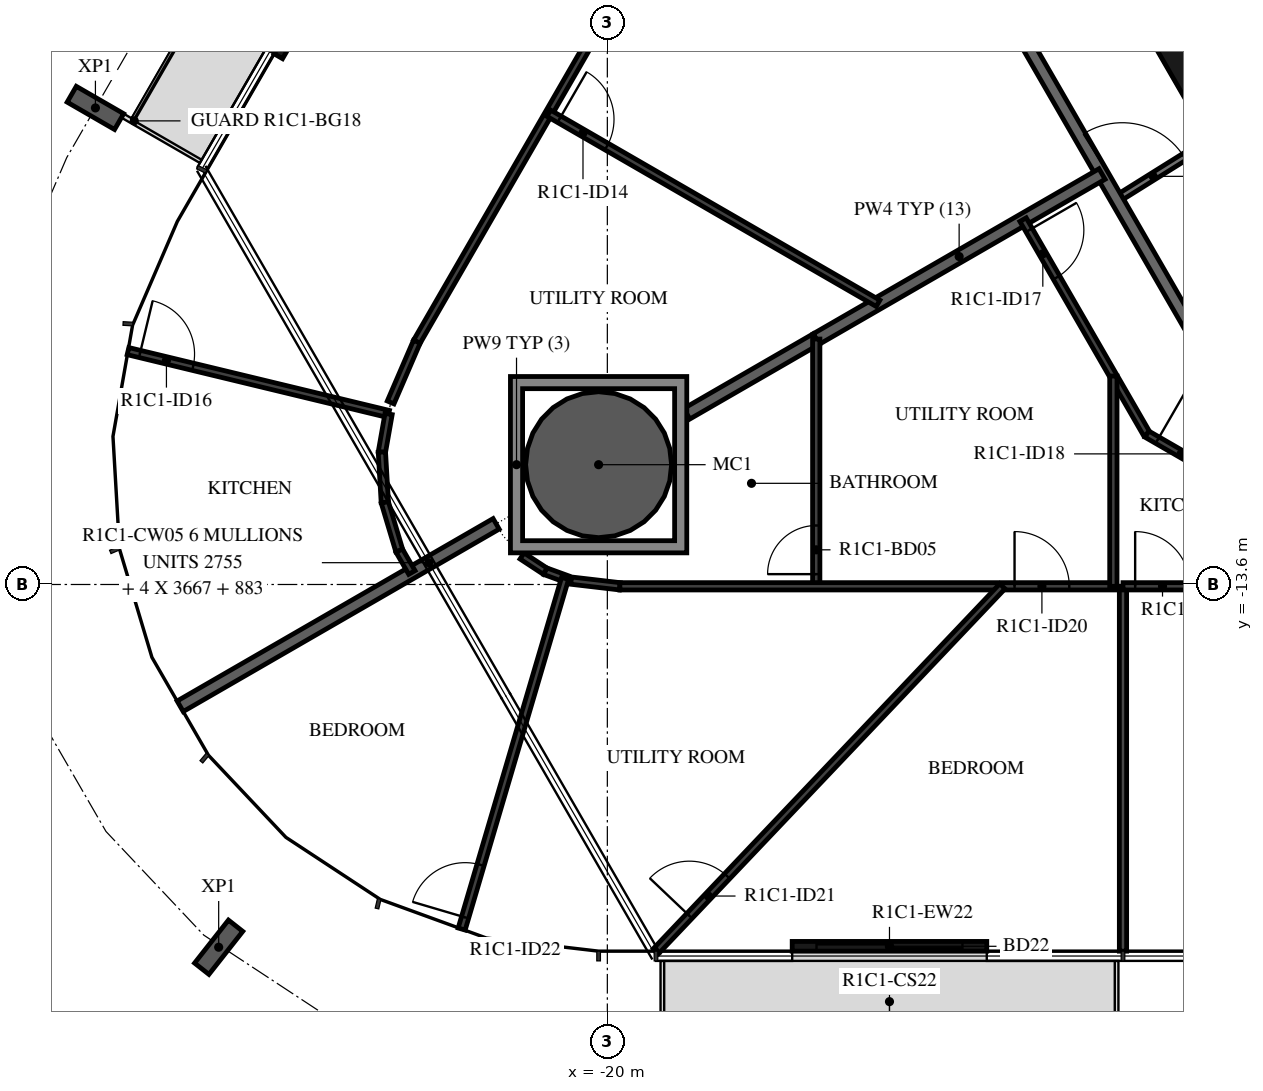
"""IFC4 building model, lengths in metres.
Left out: names, types, materials, properties, quantities, classifications, styles, units other than length and angle.
Written with IfcOpenShell. Run it as: python <this file> out.ifc"""

import sys

from ifc_helpers import new_model, si_unit, direction, frame, frame_2d, origin, origin_2d, place, context, subcontext, project, spatial, polyline, rectangle, hollow_circle, i_section, outline, extrude, element, fill, save


model = new_model("IFC4")
c1 = context("Model", 3, precision=1e-05, world=origin(), true_north=direction((0.0, 1.0)))
c2 = subcontext(c1, "Body", "Model", "MODEL_VIEW")
j1 = project(units=[si_unit("LENGTHUNIT", "METRE"), si_unit("PLANEANGLEUNIT", "RADIAN")], contexts=[c1])
p1 = place(None, origin())
s1 = spatial("IfcSite", under=j1, at=p1, CompositionType="ELEMENT")
p2 = place(p1, origin())
s2 = spatial("IfcBuilding", under=s1, at=p2, CompositionType="ELEMENT")
p3 = place(p2, frame((0.0, 0.0, 62.9)))
s3 = spatial("IfcBuildingStorey", under=s2, at=p3, CompositionType="ELEMENT", Elevation=62.9)
p4 = place(p3, frame((-20.144, -11.63, -0.38), z_axis=(0.0, 0.0, 1.0), x_axis=(1.0, 0.0, 0.0)))
e1 = element("IfcColumn", 1, at=p4, inside=s3, PredefinedType="COLUMN", context=c2, shape_type="SweptSolid", body=[
    extrude(hollow_circle(Radius=1.2, WallThickness=0.06, at=origin_2d()), origin(), (0.0, 0.0, 1.0), 3.5),
])
for number, where, z_axis, x_axis in (
    (2, (-28.419, -5.763, -0.38), (0.0, 0.0, 1.0), (0.5, 0.866, 0.0)),
    (3, (-26.392, -19.565, -0.38), (0.0, 0.0, 1.0), (-0.786, 0.619, 0.0)),
):
    element("IfcColumn", number, at=place(p3, frame(where, z_axis=z_axis, x_axis=x_axis)), inside=s3, PredefinedType="COLUMN", context=c2, shape_type="SweptSolid", body=[
        extrude(i_section(OverallWidth=0.3, OverallDepth=0.9, WebThickness=0.019, FlangeThickness=0.035, FilletRadius=0.03, at=origin_2d()), origin(), (0.0, 0.0, 1.0), 3.5),
    ])
p5 = place(p3, frame((-23.811, -2.142, 0.0), z_axis=(0.0, 0.0, 1.0), x_axis=(-0.500028443584, -0.866008981251, 0.0)))
e4 = element("IfcWall", 4, at=p5, inside=s3, PredefinedType="STANDARD", context=c2, shape_type="SweptSolid", body=[
    extrude(rectangle(XDim=3.2, YDim=0.16, at=frame_2d((1.6, 0.0))), origin(), (0.0, 0.0, 1.0), 3.12),
])
p6 = place(p5, frame((0.4, 0.0, 0.0)))
e5 = element("IfcOpeningElement", 5, at=p6, cuts=e4, PredefinedType="OPENING", context=c2, shape_type="SweptSolid", body=[
    extrude(rectangle(XDim=2.4, YDim=2.4, at=frame_2d((1.2, 1.2))), frame((0.0, 0.09, 0.0), z_axis=(0.0, -1.0, 0.0), x_axis=(1.0, 0.0, 0.0)), (0.0, 0.0, 1.0), 0.18),
])
p7 = place(p3, frame((-16.96, -19.55, 0.0), z_axis=(0.0, 0.0, 1.0), x_axis=(1.0, 0.0, 0.0)))
e6 = element("IfcWall", 6, at=p7, inside=s3, PredefinedType="STANDARD", context=c2, shape_type="SweptSolid", body=[
    extrude(rectangle(XDim=3.2, YDim=0.16, at=frame_2d((1.6, 0.0))), origin(), (0.0, 0.0, 1.0), 3.12),
])
p8 = place(p7, frame((0.4, 0.0, 0.0)))
e7 = element("IfcOpeningElement", 7, at=p8, cuts=e6, PredefinedType="OPENING", context=c2, shape_type="SweptSolid", body=[
    extrude(rectangle(XDim=2.4, YDim=2.4, at=frame_2d((1.2, 1.2))), frame((0.0, 0.09, 0.0), z_axis=(0.0, -1.0, 0.0), x_axis=(1.0, 0.0, 0.0)), (0.0, 0.0, 1.0), 0.18),
])
p9 = place(p3, frame((-10.845, -4.51, 0.0), z_axis=(0.0, 0.0, 1.0), x_axis=(0.500087131594, -0.865975092491, 0.0)))
e8 = element("IfcWall", 8, at=p9, inside=s3, PredefinedType="SHEAR", context=c2, shape_type="SweptSolid", body=[
    extrude(rectangle(XDim=3.033, YDim=0.5, at=frame_2d((1.516, 0.0))), origin(), (0.0, 0.0, 1.0), 3.12),
])
p10 = place(p3, frame((-11.625, -7.264, 0.0), z_axis=(0.0, 0.0, 1.0), x_axis=(0.84803632456, 0.529938102259, 0.0)))
e9 = element("IfcWall", 9, at=p10, inside=s3, PredefinedType="PARTITIONING", context=c2, shape_type="SweptSolid", body=[
    extrude(rectangle(XDim=1.804, YDim=0.12, at=frame_2d((0.902, 0.0))), origin(), (0.0, 0.0, 1.0), 3.12),
])
p11 = place(p10, frame((0.11, 0.0, 0.0)))
e10 = element("IfcOpeningElement", 10, at=p11, cuts=e9, PredefinedType="OPENING", context=c2, shape_type="SweptSolid", body=[
    extrude(rectangle(XDim=1.2, YDim=2.1, at=frame_2d((0.6, 1.05))), frame((0.0, 0.07, 0.0), z_axis=(0.0, -1.0, 0.0), x_axis=(1.0, 0.0, 0.0)), (0.0, 0.0, 1.0), 0.14),
])
p12 = place(p3, frame((-13.7, -3.671, 0.0), z_axis=(0.0, 0.0, 1.0), x_axis=(0.500001669485, -0.866024439905, 0.0)))
e11 = element("IfcWall", 11, at=p12, inside=s3, PredefinedType="STANDARD", context=c2, shape_type="SweptSolid", body=[
    extrude(rectangle(XDim=7.342, YDim=0.2, at=frame_2d((3.671, 0.0))), origin(), (0.0, 0.0, 1.0), 3.12),
])
p13 = place(p3, frame((-16.565, -9.564, 0.0), z_axis=(0.0, 0.0, 1.0), x_axis=(0.866028274568, 0.499995027624, 0.0)))
e12 = element("IfcWall", 12, at=p13, inside=s3, PredefinedType="STANDARD", context=c2, shape_type="SweptSolid", body=[
    extrude(rectangle(XDim=5.427, YDim=0.2, at=frame_2d((2.714, 0.0))), origin(), (0.0, 0.0, 1.0), 3.12),
])
p14 = place(p3, frame((-27.025, -15.603, 0.0), z_axis=(0.0, 0.0, 1.0), x_axis=(0.866020924479, 0.500007758305, 0.0)))
e13 = element("IfcWall", 13, at=p14, inside=s3, PredefinedType="STANDARD", context=c2, shape_type="SweptSolid", body=[
    extrude(rectangle(XDim=6.0, YDim=0.2, at=frame_2d((3.0, 0.0))), origin(), (0.0, 0.0, 1.0), 3.12),
])
p15 = place(p3, frame((-18.694, -10.793, 0.0), z_axis=(0.0, 0.0, 1.0), x_axis=(0.866046662726, 0.499963176624, 0.0)))
e14 = element("IfcWall", 14, at=p15, inside=s3, PredefinedType="STANDARD", context=c2, shape_type="SweptSolid", body=[
    extrude(rectangle(XDim=2.458, YDim=0.2, at=frame_2d((1.229, 0.0))), origin(), (0.0, 0.0, 1.0), 3.12),
])
p16 = place(p3, frame((-17.13, 0.79, 0.0), z_axis=(0.0, 0.0, 1.0), x_axis=(-0.499997052475, -0.866027105532, 0.0)))
e15 = element("IfcWall", 15, at=p16, inside=s3, PredefinedType="PARTITIONING", context=c2, shape_type="SweptSolid", body=[
    extrude(rectangle(XDim=12.006, YDim=0.12, at=frame_2d((6.003, 0.0))), origin(), (0.0, 0.0, 1.0), 3.12),
])
p17 = place(p16, frame((1.498, 0.0, 0.0)))
e16 = element("IfcOpeningElement", 16, at=p17, cuts=e15, PredefinedType="OPENING", context=c2, shape_type="SweptSolid", body=[
    extrude(rectangle(XDim=0.9, YDim=2.1, at=frame_2d((0.45, 1.05))), frame((0.0, 0.07, 0.0), z_axis=(0.0, -1.0, 0.0), x_axis=(1.0, 0.0, 0.0)), (0.0, 0.0, 1.0), 0.14),
])
p18 = place(p3, frame((-20.963, -5.85, 0.0), z_axis=(0.0, 0.0, 1.0), x_axis=(0.866021746608, -0.500006334362, 0.0)))
e17 = element("IfcWall", 17, at=p18, inside=s3, PredefinedType="PARTITIONING", context=c2, shape_type="SweptSolid", body=[
    extrude(rectangle(XDim=6.253, YDim=0.12, at=frame_2d((3.127, 0.0))), origin(), (0.0, 0.0, 1.0), 3.12),
])
p19 = place(p18, frame((0.2, 0.0, 0.0)))
e18 = element("IfcOpeningElement", 18, at=p19, cuts=e17, PredefinedType="OPENING", context=c2, shape_type="SweptSolid", body=[
    extrude(rectangle(XDim=0.9, YDim=2.1, at=frame_2d((0.45, 1.05))), frame((0.0, 0.07, 0.0), z_axis=(0.0, -1.0, 0.0), x_axis=(1.0, 0.0, 0.0)), (0.0, 0.0, 1.0), 0.14),
])
p20 = place(p3, frame((-23.564, -10.606, 0.0), z_axis=(0.0, 0.0, 1.0), x_axis=(0.396195073027, 0.918166359713, 0.0)))
e19 = element("IfcWall", 19, at=p20, inside=s3, PredefinedType="PARTITIONING", context=c2, shape_type="SweptSolid", body=[
    extrude(rectangle(XDim=1.087, YDim=0.12, at=frame_2d((0.543, 0.0))), origin(), (0.0, 0.0, 1.0), 3.12),
])
p21 = place(p3, frame((-27.883, -9.762, 0.0), z_axis=(0.0, 0.0, 1.0), x_axis=(0.972097015458, -0.234579181809, 0.0)))
e20 = element("IfcWall", 20, at=p21, inside=s3, PredefinedType="PARTITIONING", context=c2, shape_type="SweptSolid", body=[
    extrude(rectangle(XDim=4.409, YDim=0.12, at=frame_2d((2.204, 0.0))), origin(), (0.0, 0.0, 1.0), 3.12),
])
p22 = place(p21, frame((0.2, 0.0, 0.0)))
e21 = element("IfcOpeningElement", 21, at=p22, cuts=e20, PredefinedType="OPENING", context=c2, shape_type="SweptSolid", body=[
    extrude(rectangle(XDim=0.9, YDim=2.1, at=frame_2d((0.45, 1.05))), frame((0.0, 0.07, 0.0), z_axis=(0.0, -1.0, 0.0), x_axis=(1.0, 0.0, 0.0)), (0.0, 0.0, 1.0), 0.14),
])
p23 = place(p3, frame((-23.597, -10.796, 0.0), z_axis=(0.0, 0.0, 1.0), x_axis=(-0.173610040386, -0.984814476882, 0.0)))
e22 = element("IfcWall", 22, at=p23, inside=s3, PredefinedType="PARTITIONING", context=c2, shape_type="SweptSolid", body=[
    extrude(rectangle(XDim=0.636, YDim=0.12, at=frame_2d((0.318, 0.0))), origin(), (0.0, 0.0, 1.0), 3.12),
])
p24 = place(p3, frame((-23.708, -11.422, 0.0), z_axis=(0.0, 0.0, 1.0), x_axis=(0.058031280246, -0.998314765248, 0.0)))
e23 = element("IfcWall", 23, at=p24, inside=s3, PredefinedType="PARTITIONING", context=c2, shape_type="SweptSolid", body=[
    extrude(rectangle(XDim=0.829, YDim=0.12, at=frame_2d((0.415, 0.0))), origin(), (0.0, 0.0, 1.0), 3.12),
])
p25 = place(p3, frame((-23.659, -12.25, 0.0), z_axis=(0.0, 0.0, 1.0), x_axis=(0.286834510868, -0.957980147694, 0.0)))
e24 = element("IfcWall", 24, at=p25, inside=s3, PredefinedType="PARTITIONING", context=c2, shape_type="SweptSolid", body=[
    extrude(rectangle(XDim=0.829, YDim=0.12, at=frame_2d((0.415, 0.0))), origin(), (0.0, 0.0, 1.0), 3.12),
])
p26 = place(p3, frame((-23.422, -13.044, 0.0), z_axis=(0.0, 0.0, 1.0), x_axis=(0.50013037474, -0.865950118807, 0.0)))
e25 = element("IfcWall", 25, at=p26, inside=s3, PredefinedType="PARTITIONING", context=c2, shape_type="SweptSolid", body=[
    extrude(rectangle(XDim=0.415, YDim=0.12, at=frame_2d((0.207, 0.0))), origin(), (0.0, 0.0, 1.0), 3.12),
])
p27 = place(p3, frame((-13.164, -7.6, 0.0), z_axis=(0.0, 0.0, 1.0), x_axis=(0.500000928893, -0.866024867487, 0.0)))
e26 = element("IfcWall", 26, at=p27, inside=s3, PredefinedType="PARTITIONING", context=c2, shape_type="SweptSolid", body=[
    extrude(rectangle(XDim=4.073, YDim=0.12, at=frame_2d((2.036, 0.0))), origin(), (0.0, 0.0, 1.0), 3.12),
])
p28 = place(p27, frame((0.2, 0.0, 0.0)))
e27 = element("IfcOpeningElement", 27, at=p28, cuts=e26, PredefinedType="OPENING", context=c2, shape_type="SweptSolid", body=[
    extrude(rectangle(XDim=0.9, YDim=2.1, at=frame_2d((0.45, 1.05))), frame((0.0, 0.07, 0.0), z_axis=(0.0, -1.0, 0.0), x_axis=(1.0, 0.0, 0.0)), (0.0, 0.0, 1.0), 0.14),
])
p29 = place(p3, frame((-11.127, -11.127, 0.0), z_axis=(0.0, 0.0, 1.0), x_axis=(0.866034514313, -0.499984219769, 0.0)))
e28 = element("IfcWall", 28, at=p29, inside=s3, PredefinedType="PARTITIONING", context=c2, shape_type="SweptSolid", body=[
    extrude(rectangle(XDim=5.006, YDim=0.12, at=frame_2d((2.503, 0.0))), origin(), (0.0, 0.0, 1.0), 3.12),
])
p30 = place(p29, frame((0.2, 0.0, 0.0)))
e29 = element("IfcOpeningElement", 29, at=p30, cuts=e28, PredefinedType="OPENING", context=c2, shape_type="SweptSolid", body=[
    extrude(rectangle(XDim=0.9, YDim=2.1, at=frame_2d((0.45, 1.05))), frame((0.0, 0.07, 0.0), z_axis=(0.0, -1.0, 0.0), x_axis=(1.0, 0.0, 0.0)), (0.0, 0.0, 1.0), 0.14),
])
p31 = place(p3, frame((-20.657, -13.514, 0.0), z_axis=(0.0, 0.0, 1.0), x_axis=(-0.939665068469, 0.34209583321, 0.0)))
e30 = element("IfcWall", 30, at=p31, inside=s3, PredefinedType="PARTITIONING", context=c2, shape_type="SweptSolid", body=[
    extrude(rectangle(XDim=0.389, YDim=0.12, at=frame_2d((0.194, 0.0))), origin(), (0.0, 0.0, 1.0), 3.12),
])
p32 = place(p3, frame((-21.023, -13.381, 0.0), z_axis=(0.0, 0.0, 1.0), x_axis=(-0.835339231854, 0.549734815821, 0.0)))
e31 = element("IfcWall", 31, at=p32, inside=s3, PredefinedType="PARTITIONING", context=c2, shape_type="SweptSolid", body=[
    extrude(rectangle(XDim=0.455, YDim=0.12, at=frame_2d((0.228, 0.0))), origin(), (0.0, 0.0, 1.0), 3.12),
])
p33 = place(p3, frame((-22.396, -19.266, 0.0), z_axis=(0.0, 0.0, 1.0), x_axis=(0.282896205585, 0.959150528783, 0.0)))
e32 = element("IfcWall", 32, at=p33, inside=s3, PredefinedType="PARTITIONING", context=c2, shape_type="SweptSolid", body=[
    extrude(rectangle(XDim=6.012, YDim=0.12, at=frame_2d((3.006, 0.0))), origin(), (0.0, 0.0, 1.0), 3.12),
])
p34 = place(p33, frame((0.2, 0.0, 0.0)))
e33 = element("IfcOpeningElement", 33, at=p34, cuts=e32, PredefinedType="OPENING", context=c2, shape_type="SweptSolid", body=[
    extrude(rectangle(XDim=0.9, YDim=2.1, at=frame_2d((0.45, 1.05))), frame((0.0, 0.07, 0.0), z_axis=(0.0, -1.0, 0.0), x_axis=(1.0, 0.0, 0.0)), (0.0, 0.0, 1.0), 0.14),
])
p35 = place(p3, frame((-16.565, -13.63, 0.0), z_axis=(0.0, 0.0, 1.0), x_axis=(0.0, 1.0, 0.0)))
e34 = element("IfcWall", 34, at=p35, inside=s3, PredefinedType="PARTITIONING", context=c2, shape_type="SweptSolid", body=[
    extrude(rectangle(XDim=4.066, YDim=0.12, at=frame_2d((2.033, 0.0))), origin(), (0.0, 0.0, 1.0), 3.12),
])
p36 = place(p35, frame((0.2, 0.0, 0.0)))
e35 = element("IfcOpeningElement", 35, at=p36, cuts=e34, PredefinedType="OPENING", context=c2, shape_type="SweptSolid", body=[
    extrude(rectangle(XDim=0.8, YDim=2.1, at=frame_2d((0.4, 1.05))), frame((0.0, 0.07, 0.0), z_axis=(0.0, -1.0, 0.0), x_axis=(1.0, 0.0, 0.0)), (0.0, 0.0, 1.0), 0.14),
])
p37 = place(p3, frame((-20.595, -13.536, 0.0), z_axis=(0.0, 0.0, 1.0), x_axis=(0.993259655268, -0.115910556968, 0.0)))
e36 = element("IfcWall", 36, at=p37, inside=s3, PredefinedType="PARTITIONING", context=c2, shape_type="SweptSolid", body=[
    extrude(rectangle(XDim=0.807, YDim=0.12, at=frame_2d((0.403, 0.0))), origin(), (0.0, 0.0, 1.0), 3.12),
])
p38 = place(p3, frame((-19.794, -13.63, 0.0), z_axis=(0.0, 0.0, 1.0), x_axis=(1.0, 0.0, 0.0)))
e37 = element("IfcWall", 37, at=p38, inside=s3, PredefinedType="PARTITIONING", context=c2, shape_type="SweptSolid", body=[
    extrude(rectangle(XDim=8.156, YDim=0.12, at=frame_2d((4.078, 0.0))), origin(), (0.0, 0.0, 1.0), 3.12),
])
p39 = place(p38, frame((6.491, 0.0, 0.0)))
e38 = element("IfcOpeningElement", 38, at=p39, cuts=e37, PredefinedType="OPENING", context=c2, shape_type="SweptSolid", body=[
    extrude(rectangle(XDim=0.9, YDim=2.1, at=frame_2d((0.45, 1.05))), frame((0.0, 0.07, 0.0), z_axis=(0.0, -1.0, 0.0), x_axis=(1.0, 0.0, 0.0)), (0.0, 0.0, 1.0), 0.14),
])
p40 = place(p3, frame((-11.678, -13.63, 0.0), z_axis=(0.0, 0.0, 1.0), x_axis=(0.0, 1.0, 0.0)))
e39 = element("IfcWall", 39, at=p40, inside=s3, PredefinedType="PARTITIONING", context=c2, shape_type="SweptSolid", body=[
    extrude(rectangle(XDim=3.458, YDim=0.12, at=frame_2d((1.729, 0.0))), origin(), (0.0, 0.0, 1.0), 3.12),
])
p41 = place(p3, frame((-19.2, -19.63, 0.0), z_axis=(0.0, 0.0, 1.0), x_axis=(0.688544699396, 0.72519390299, 0.0)))
e40 = element("IfcWall", 40, at=p41, inside=s3, PredefinedType="PARTITIONING", context=c2, shape_type="SweptSolid", body=[
    extrude(rectangle(XDim=8.274, YDim=0.12, at=frame_2d((4.137, 0.0))), origin(), (0.0, 0.0, 1.0), 3.12),
])
p42 = place(p41, frame((0.8, 0.0, 0.0)))
e41 = element("IfcOpeningElement", 41, at=p42, cuts=e40, PredefinedType="OPENING", context=c2, shape_type="SweptSolid", body=[
    extrude(rectangle(XDim=0.9, YDim=2.1, at=frame_2d((0.45, 1.05))), frame((0.0, 0.07, 0.0), z_axis=(0.0, -1.0, 0.0), x_axis=(1.0, 0.0, 0.0)), (0.0, 0.0, 1.0), 0.14),
])
p43 = place(p3, frame((-11.52, -19.63, 0.0), z_axis=(0.0, 0.0, 1.0), x_axis=(0.0, 1.0, 0.0)))
e42 = element("IfcWall", 42, at=p43, inside=s3, PredefinedType="PARTITIONING", context=c2, shape_type="SweptSolid", body=[
    extrude(rectangle(XDim=6.0, YDim=0.12, at=frame_2d((3.0, 0.0))), origin(), (0.0, 0.0, 1.0), 2.73),
])
p44 = place(p3, frame((-11.52, -13.63, 0.0), z_axis=(0.0, 0.0, 1.0), x_axis=(1.0, 0.0, 0.0)))
e43 = element("IfcWall", 43, at=p44, inside=s3, PredefinedType="PARTITIONING", context=c2, shape_type="SweptSolid", body=[
    extrude(rectangle(XDim=4.728, YDim=0.12, at=frame_2d((2.364, 0.0))), origin(), (0.0, 0.0, 1.0), 3.12),
])
p45 = place(p44, frame((0.2, 0.0, 0.0)))
e44 = element("IfcOpeningElement", 44, at=p45, cuts=e43, PredefinedType="OPENING", context=c2, shape_type="SweptSolid", body=[
    extrude(rectangle(XDim=0.9, YDim=2.1, at=frame_2d((0.45, 1.05))), frame((0.0, 0.07, 0.0), z_axis=(0.0, -1.0, 0.0), x_axis=(1.0, 0.0, 0.0)), (0.0, 0.0, 1.0), 0.14),
])
p46 = place(p3, origin())
e45 = element("IfcWall", 45, at=p46, inside=s3, PredefinedType="STANDARD", context=c2, shape_type="SweptSolid", body=[
    extrude(outline(polyline([(-18.694, -10.18), (-18.694, -13.08), (-21.594, -13.08), (-21.594, -10.18), (-18.694, -10.18)]), holes=[polyline([(-21.394, -12.88), (-18.894, -12.88), (-18.894, -10.38), (-21.394, -10.38), (-21.394, -12.88)])]), origin(), (0.0, 0.0, 1.0), 3.12),
])
p47 = place(p8, origin())
e46 = element("IfcDoor", 46, at=p47, inside=s3, OperationType="DOUBLE_DOOR_SLIDING", PredefinedType="DOOR", context=c2, shape_type="SweptSolid", body=[
    extrude(rectangle(XDim=2.4, YDim=2.4, at=frame_2d((1.2, 1.2))), frame((0.0, 0.025, 0.0), z_axis=(0.0, -1.0, 0.0), x_axis=(1.0, 0.0, 0.0)), (0.0, 0.0, 1.0), 0.05),
])
fill(e7, e46)
p48 = place(p19, origin())
e47 = element("IfcDoor", 47, at=p48, inside=s3, OperationType="SINGLE_SWING_RIGHT", PredefinedType="DOOR", context=c2, shape_type="SweptSolid", body=[
    extrude(rectangle(XDim=0.9, YDim=2.1, at=frame_2d((0.45, 1.05))), frame((0.0, 0.025, 0.0), z_axis=(0.0, -1.0, 0.0), x_axis=(1.0, 0.0, 0.0)), (0.0, 0.0, 1.0), 0.05),
])
fill(e18, e47)
p49 = place(p22, origin())
e48 = element("IfcDoor", 48, at=p49, inside=s3, OperationType="SINGLE_SWING_RIGHT", PredefinedType="DOOR", context=c2, shape_type="SweptSolid", body=[
    extrude(rectangle(XDim=0.9, YDim=2.1, at=frame_2d((0.45, 1.05))), frame((0.0, 0.025, 0.0), z_axis=(0.0, -1.0, 0.0), x_axis=(1.0, 0.0, 0.0)), (0.0, 0.0, 1.0), 0.05),
])
fill(e21, e48)
p50 = place(p28, origin())
e49 = element("IfcDoor", 49, at=p50, inside=s3, OperationType="SINGLE_SWING_LEFT", PredefinedType="DOOR", context=c2, shape_type="SweptSolid", body=[
    extrude(rectangle(XDim=0.9, YDim=2.1, at=frame_2d((0.45, 1.05))), frame((0.0, 0.025, 0.0), z_axis=(0.0, -1.0, 0.0), x_axis=(1.0, 0.0, 0.0)), (0.0, 0.0, 1.0), 0.05),
])
fill(e27, e49)
p51 = place(p30, origin())
e50 = element("IfcDoor", 50, at=p51, inside=s3, OperationType="SINGLE_SWING_LEFT", PredefinedType="DOOR", context=c2, shape_type="SweptSolid", body=[
    extrude(rectangle(XDim=0.9, YDim=2.1, at=frame_2d((0.45, 1.05))), frame((0.0, 0.025, 0.0), z_axis=(0.0, -1.0, 0.0), x_axis=(1.0, 0.0, 0.0)), (0.0, 0.0, 1.0), 0.05),
])
fill(e29, e50)
p52 = place(p36, origin())
e51 = element("IfcDoor", 51, at=p52, inside=s3, OperationType="SINGLE_SWING_LEFT", PredefinedType="DOOR", context=c2, shape_type="SweptSolid", body=[
    extrude(rectangle(XDim=0.8, YDim=2.1, at=frame_2d((0.4, 1.05))), frame((0.0, 0.025, 0.0), z_axis=(0.0, -1.0, 0.0), x_axis=(1.0, 0.0, 0.0)), (0.0, 0.0, 1.0), 0.05),
])
fill(e35, e51)
p53 = place(p39, origin())
e52 = element("IfcDoor", 52, at=p53, inside=s3, OperationType="SINGLE_SWING_LEFT", PredefinedType="DOOR", context=c2, shape_type="SweptSolid", body=[
    extrude(rectangle(XDim=0.9, YDim=2.1, at=frame_2d((0.45, 1.05))), frame((0.0, 0.025, 0.0), z_axis=(0.0, -1.0, 0.0), x_axis=(1.0, 0.0, 0.0)), (0.0, 0.0, 1.0), 0.05),
])
fill(e38, e52)
p54 = place(p42, origin())
e53 = element("IfcDoor", 53, at=p54, inside=s3, OperationType="SINGLE_SWING_LEFT", PredefinedType="DOOR", context=c2, shape_type="SweptSolid", body=[
    extrude(rectangle(XDim=0.9, YDim=2.1, at=frame_2d((0.45, 1.05))), frame((0.0, 0.025, 0.0), z_axis=(0.0, -1.0, 0.0), x_axis=(1.0, 0.0, 0.0)), (0.0, 0.0, 1.0), 0.05),
])
fill(e41, e53)
p55 = place(p34, origin())
e54 = element("IfcDoor", 54, at=p55, inside=s3, OperationType="SINGLE_SWING_LEFT", PredefinedType="DOOR", context=c2, shape_type="SweptSolid", body=[
    extrude(rectangle(XDim=0.9, YDim=2.1, at=frame_2d((0.45, 1.05))), frame((0.0, 0.025, 0.0), z_axis=(0.0, -1.0, 0.0), x_axis=(1.0, 0.0, 0.0)), (0.0, 0.0, 1.0), 0.05),
])
fill(e33, e54)
p56 = place(p45, origin())
e55 = element("IfcDoor", 55, at=p56, inside=s3, OperationType="SINGLE_SWING_RIGHT", PredefinedType="DOOR", context=c2, shape_type="SweptSolid", body=[
    extrude(rectangle(XDim=0.9, YDim=2.1, at=frame_2d((0.45, 1.05))), frame((0.0, 0.025, 0.0), z_axis=(0.0, -1.0, 0.0), x_axis=(1.0, 0.0, 0.0)), (0.0, 0.0, 1.0), 0.05),
])
fill(e44, e55)
p57 = place(p11, origin())
e56 = element("IfcDoor", 56, at=p57, inside=s3, OperationType="DOUBLE_DOOR_SINGLE_SWING", PredefinedType="DOOR", context=c2, shape_type="SweptSolid", body=[
    extrude(rectangle(XDim=1.2, YDim=2.1, at=frame_2d((0.6, 1.05))), frame((0.0, 0.025, 0.0), z_axis=(0.0, -1.0, 0.0), x_axis=(1.0, 0.0, 0.0)), (0.0, 0.0, 1.0), 0.05),
])
fill(e10, e56)
save(model, sys.argv[1])
